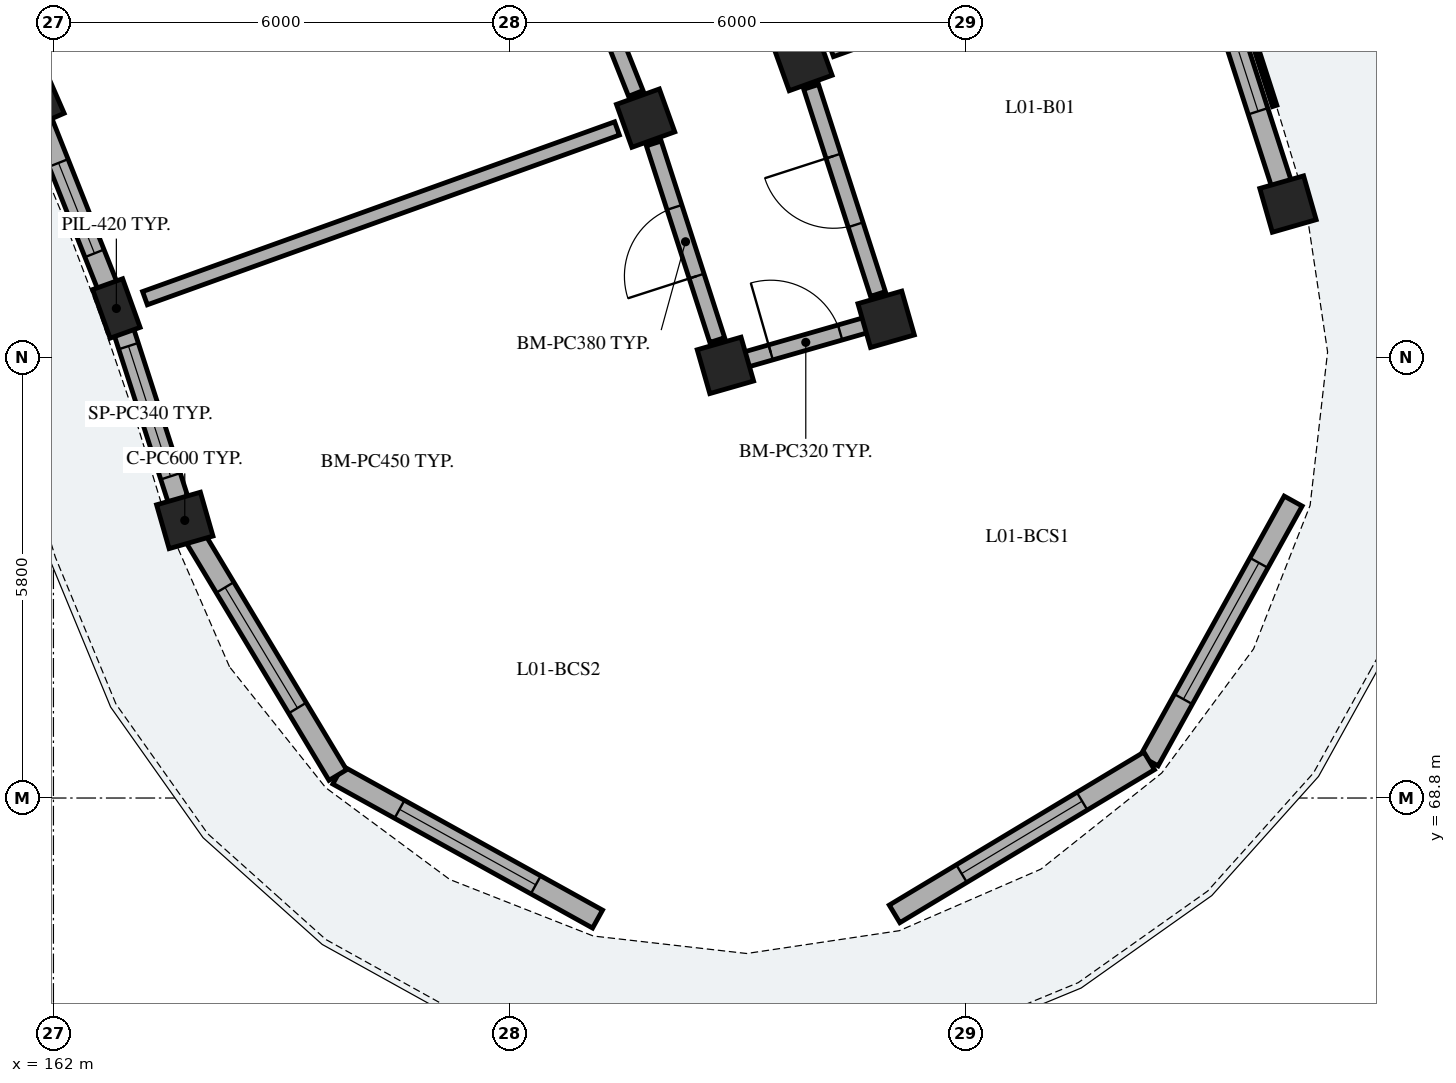
"""IFC4 building model, lengths in metres.
Left out: names, types, materials, properties, quantities, classifications, styles, units other than length and angle.
Written with IfcOpenShell. Run it as: python <this file> out.ifc"""

import sys

from ifc_helpers import new_model, si_unit, direction, frame, frame_2d, origin, origin_2d, place, context, subcontext, project, spatial, rectangle, extrude, element, fill, save


model = new_model("IFC4")
c1 = context("Model", 3, precision=1e-05, world=origin(), true_north=direction((0.0, 1.0)))
c2 = subcontext(c1, "Body", "Model", "MODEL_VIEW")
j1 = project(units=[si_unit("LENGTHUNIT", "METRE"), si_unit("PLANEANGLEUNIT", "RADIAN")], contexts=[c1])
p1 = place(None, origin())
s1 = spatial("IfcSite", under=j1, at=p1, CompositionType="ELEMENT")
p2 = place(p1, origin())
s2 = spatial("IfcBuilding", under=s1, at=p2, CompositionType="ELEMENT")
p3 = place(p2, frame((0.0, 0.0, 4.76)))
s3 = spatial("IfcBuildingStorey", under=s2, at=p3, CompositionType="ELEMENT", Elevation=4.76)
for number, where, z_axis, x_axis in (
    (1, (163.728, 72.452, 0.0), (0.0, 0.0, 1.0), (0.961, 0.276, 0.0)),
    (2, (170.841, 74.492, 0.0), (0.0, 0.0, 1.0), (0.961, 0.276, 0.0)),
    (3, (172.956, 75.098, 0.0), (0.0, 0.0, 1.0), (0.961, 0.276, 0.0)),
    (4, (178.243, 76.614, 0.0), (0.0, 0.0, 1.0), (0.961, 0.276, 0.0)),
):
    element("IfcColumn", number, at=place(p3, frame(where, z_axis=z_axis, x_axis=x_axis)), inside=s3, PredefinedType="COLUMN", context=c2, shape_type="SweptSolid", body=[
        extrude(rectangle(XDim=0.6, YDim=0.6, at=origin_2d()), origin(), (0.0, 0.0, 1.0), 3.825),
    ])
p4 = place(p3, frame((162.828, 75.241, 0.0), z_axis=(0.0, 0.0, 1.0), x_axis=(0.941012076693, 0.338372976931, 0.0)))
e5 = element("IfcColumn", 5, at=p4, inside=s3, PredefinedType="PILASTER", context=c2, shape_type="SweptSolid", body=[
    extrude(rectangle(XDim=0.42, YDim=0.68, at=origin_2d()), origin(), (0.0, 0.0, 1.0), 3.825),
])
for number, where, z_axis, x_axis in (
    (6, (169.792, 77.745, 0.0), (0.0, 0.0, 1.0), (0.941, 0.338, 0.0)),
    (7, (171.862, 78.489, 0.0), (0.0, 0.0, 1.0), (0.941, 0.338, 0.0)),
    (8, (161.746, 77.964, 0.0), (0.0, 0.0, 1.0), (0.917, 0.4, 0.0)),
):
    element("IfcColumn", number, at=place(p3, frame(where, z_axis=z_axis, x_axis=x_axis)), inside=s3, PredefinedType="COLUMN", context=c2, shape_type="SweptSolid", body=[
        extrude(rectangle(XDim=0.6, YDim=0.6, at=origin_2d()), origin(), (0.0, 0.0, 1.0), 3.825),
    ])
p5 = place(p3, frame((178.16, 76.871, 0.0), z_axis=(0.0, 0.0, 1.0), x_axis=(-0.307173119512, 0.951653652675, 0.0)))
e9 = element("IfcWall", 9, at=p5, inside=s3, PredefinedType="SOLIDWALL", context=c2, shape_type="SweptSolid", body=[
    extrude(rectangle(XDim=3.476, YDim=0.27, at=frame_2d((1.738, 0.0))), origin(), (0.0, 0.0, 1.0), 3.075),
])
p6 = place(p5, frame((1.013, 0.0, 0.55)))
e10 = element("IfcOpeningElement", 10, at=p6, cuts=e9, PredefinedType="OPENING", context=c2, shape_type="SweptSolid", body=[
    extrude(rectangle(XDim=1.45, YDim=1.7, at=frame_2d((0.725, 0.85))), frame((0.0, 0.145, 0.0), z_axis=(0.0, -1.0, 0.0), x_axis=(1.0, 0.0, 0.0)), (0.0, 0.0, 1.0), 0.29),
])
p7 = place(p3, frame((163.645, 72.709, 0.0), z_axis=(0.0, 0.0, 1.0), x_axis=(-0.307206966374, 0.951642726979, 0.0)))
e11 = element("IfcWall", 11, at=p7, inside=s3, PredefinedType="SOLIDWALL", context=c2, shape_type="SweptSolid", body=[
    extrude(rectangle(XDim=2.48, YDim=0.27, at=frame_2d((1.24, 0.0))), origin(), (0.0, 0.0, 1.0), 3.075),
])
p8 = place(p7, frame((0.34, 0.0, 0.55)))
e12 = element("IfcOpeningElement", 12, at=p8, cuts=e11, PredefinedType="OPENING", context=c2, shape_type="SweptSolid", body=[
    extrude(rectangle(XDim=1.8, YDim=1.85, at=frame_2d((0.9, 0.925))), frame((0.0, 0.145, 0.0), z_axis=(0.0, -1.0, 0.0), x_axis=(1.0, 0.0, 0.0)), (0.0, 0.0, 1.0), 0.29),
])
p9 = place(p3, frame((162.761, 75.408, 0.0), z_axis=(0.0, 0.0, 1.0), x_axis=(-0.369234261829, 0.929336354552, 0.0)))
e13 = element("IfcWall", 13, at=p9, inside=s3, PredefinedType="SOLIDWALL", context=c2, shape_type="SweptSolid", body=[
    extrude(rectangle(XDim=2.48, YDim=0.27, at=frame_2d((1.24, 0.0))), origin(), (0.0, 0.0, 1.0), 3.075),
])
p10 = place(p9, frame((0.6, 0.0, 0.55)))
e14 = element("IfcOpeningElement", 14, at=p10, cuts=e13, PredefinedType="OPENING", context=c2, shape_type="SweptSolid", body=[
    extrude(rectangle(XDim=1.28, YDim=1.52, at=frame_2d((0.64, 0.76))), frame((0.0, 0.145, 0.0), z_axis=(0.0, -1.0, 0.0), x_axis=(1.0, 0.0, 0.0)), (0.0, 0.0, 1.0), 0.29),
])
p11 = place(p3, frame((178.311, 72.707, 0.0), z_axis=(0.0, 0.0, 1.0), x_axis=(-0.484841794757, -0.874601871743, 0.0)))
e15 = element("IfcWall", 15, at=p11, inside=s3, PredefinedType="SOLIDWALL", context=c2, shape_type="SweptSolid", body=[
    extrude(rectangle(XDim=3.908, YDim=0.27, at=frame_2d((1.954, 0.0))), origin(), (0.0, 0.0, 1.0), 3.075),
])
p12 = place(p11, frame((0.929, 0.0, 0.4)))
e16 = element("IfcOpeningElement", 16, at=p12, cuts=e15, PredefinedType="OPENING", context=c2, shape_type="SweptSolid", body=[
    extrude(rectangle(XDim=2.05, YDim=1.82, at=frame_2d((1.025, 0.91))), frame((0.0, 0.145, 0.0), z_axis=(0.0, -1.0, 0.0), x_axis=(1.0, 0.0, 0.0)), (0.0, 0.0, 1.0), 0.29),
])
p13 = place(p3, frame((176.417, 69.289, 0.0), z_axis=(0.0, 0.0, 1.0), x_axis=(-0.85715098885, -0.515065221417, 0.0)))
e17 = element("IfcWall", 17, at=p13, inside=s3, PredefinedType="SOLIDWALL", context=c2, shape_type="SweptSolid", body=[
    extrude(rectangle(XDim=3.908, YDim=0.27, at=frame_2d((1.954, 0.0))), origin(), (0.0, 0.0, 1.0), 3.075),
])
p14 = place(p13, frame((1.029, 0.0, 0.4)))
e18 = element("IfcOpeningElement", 18, at=p14, cuts=e17, PredefinedType="OPENING", context=c2, shape_type="SweptSolid", body=[
    extrude(rectangle(XDim=1.85, YDim=1.72, at=frame_2d((0.925, 0.86))), frame((0.0, 0.145, 0.0), z_axis=(0.0, -1.0, 0.0), x_axis=(1.0, 0.0, 0.0)), (0.0, 0.0, 1.0), 0.29),
])
p15 = place(p3, frame((169.159, 67.208, 0.0), z_axis=(0.0, 0.0, 1.0), x_axis=(-0.874643043537, 0.484767517881, 0.0)))
e19 = element("IfcWall", 19, at=p15, inside=s3, PredefinedType="SOLIDWALL", context=c2, shape_type="SweptSolid", body=[
    extrude(rectangle(XDim=3.908, YDim=0.27, at=frame_2d((1.954, 0.0))), origin(), (0.0, 0.0, 1.0), 3.075),
])
p16 = place(p15, frame((0.929, 0.0, 0.4)))
e20 = element("IfcOpeningElement", 20, at=p16, cuts=e19, PredefinedType="OPENING", context=c2, shape_type="SweptSolid", body=[
    extrude(rectangle(XDim=2.05, YDim=1.82, at=frame_2d((1.025, 0.91))), frame((0.0, 0.145, 0.0), z_axis=(0.0, -1.0, 0.0), x_axis=(1.0, 0.0, 0.0)), (0.0, 0.0, 1.0), 0.29),
])
p17 = place(p3, frame((165.741, 69.102, 0.0), z_axis=(0.0, 0.0, 1.0), x_axis=(-0.515037642827, 0.857167560324, 0.0)))
e21 = element("IfcWall", 21, at=p17, inside=s3, PredefinedType="SOLIDWALL", context=c2, shape_type="SweptSolid", body=[
    extrude(rectangle(XDim=3.908, YDim=0.27, at=frame_2d((1.954, 0.0))), origin(), (0.0, 0.0, 1.0), 3.075),
])
p18 = place(p17, frame((1.029, 0.0, 0.4)))
e22 = element("IfcOpeningElement", 22, at=p18, cuts=e21, PredefinedType="OPENING", context=c2, shape_type="SweptSolid", body=[
    extrude(rectangle(XDim=1.85, YDim=1.72, at=frame_2d((0.925, 0.86))), frame((0.0, 0.145, 0.0), z_axis=(0.0, -1.0, 0.0), x_axis=(1.0, 0.0, 0.0)), (0.0, 0.0, 1.0), 0.29),
])
p19 = place(p3, frame((172.849, 75.431, 0.0), z_axis=(0.0, 0.0, 1.0), x_axis=(-0.307157249761, 0.951658774939, 0.0)))
e23 = element("IfcWall", 23, at=p19, inside=s3, PredefinedType="PARTITIONING", context=c2, shape_type="SweptSolid", body=[
    extrude(rectangle(XDim=2.863, YDim=0.205, at=frame_2d((1.432, 0.0))), origin(), (0.0, 0.0, 1.0), 3.09),
])
p20 = place(p19, frame((0.957, 0.0, 0.0)))
e24 = element("IfcOpeningElement", 24, at=p20, cuts=e23, PredefinedType="OPENING", context=c2, shape_type="SweptSolid", body=[
    extrude(rectangle(XDim=0.95, YDim=2.13, at=frame_2d((0.475, 1.065))), frame((0.0, 0.113, 0.0), z_axis=(0.0, -1.0, 0.0), x_axis=(1.0, 0.0, 0.0)), (0.0, 0.0, 1.0), 0.225),
])
p21 = place(p3, frame((170.734, 74.825, 0.0), z_axis=(0.0, 0.0, 1.0), x_axis=(-0.307186478934, 0.95164934044, 0.0)))
e25 = element("IfcWall", 25, at=p21, inside=s3, PredefinedType="PARTITIONING", context=c2, shape_type="SweptSolid", body=[
    extrude(rectangle(XDim=2.718, YDim=0.205, at=frame_2d((1.359, 0.0))), origin(), (0.0, 0.0, 1.0), 3.09),
])
p22 = place(p21, frame((0.884, 0.0, 0.0)))
e26 = element("IfcOpeningElement", 26, at=p22, cuts=e25, PredefinedType="OPENING", context=c2, shape_type="SweptSolid", body=[
    extrude(rectangle(XDim=0.95, YDim=2.13, at=frame_2d((0.475, 1.065))), frame((0.0, 0.113, 0.0), z_axis=(0.0, -1.0, 0.0), x_axis=(1.0, 0.0, 0.0)), (0.0, 0.0, 1.0), 0.225),
])
p23 = place(p3, frame((172.238, 78.625, 0.0), z_axis=(0.0, 0.0, 1.0), x_axis=(0.941015806044, 0.338362605463, 0.0)))
e27 = element("IfcWall", 27, at=p23, inside=s3, PredefinedType="PLUMBINGWALL", context=c2, shape_type="SweptSolid", body=[
    extrude(rectangle(XDim=4.7, YDim=0.15, at=frame_2d((2.35, 0.0))), origin(), (0.0, 0.0, 1.0), 3.09),
])
p24 = place(p23, frame((1.92, 0.0, 0.0)))
e28 = element("IfcOpeningElement", 28, at=p24, cuts=e27, PredefinedType="OPENING", context=c2, shape_type="SweptSolid", body=[
    extrude(rectangle(XDim=0.86, YDim=2.06, at=frame_2d((0.43, 1.03))), frame((0.0, 0.085, 0.0), z_axis=(0.0, -1.0, 0.0), x_axis=(1.0, 0.0, 0.0)), (0.0, 0.0, 1.0), 0.17),
])
p25 = place(p3, frame((163.204, 75.376, 0.0), z_axis=(0.0, 0.0, 1.0), x_axis=(0.941005714099, 0.338390670725, 0.0)))
e29 = element("IfcWall", 29, at=p25, inside=s3, PredefinedType="PARTITIONING", context=c2, shape_type="SweptSolid", body=[
    extrude(rectangle(XDim=6.6, YDim=0.185, at=frame_2d((3.3, 0.0))), origin(), (0.0, 0.0, 1.0), 3.09),
])
p26 = place(p3, frame((169.662, 78.07, 0.0), z_axis=(0.0, 0.0, 1.0), x_axis=(-0.369237170461, 0.929335198919, 0.0)))
e30 = element("IfcWall", 30, at=p26, inside=s3, PredefinedType="PARTITIONING", context=c2, shape_type="SweptSolid", body=[
    extrude(rectangle(XDim=2.718, YDim=0.205, at=frame_2d((1.359, 0.0))), origin(), (0.0, 0.0, 1.0), 3.09),
])
p27 = place(p26, frame((0.894, 0.0, 0.0)))
e31 = element("IfcOpeningElement", 31, at=p27, cuts=e30, PredefinedType="OPENING", context=c2, shape_type="SweptSolid", body=[
    extrude(rectangle(XDim=0.93, YDim=2.12, at=frame_2d((0.465, 1.06))), frame((0.0, 0.113, 0.0), z_axis=(0.0, -1.0, 0.0), x_axis=(1.0, 0.0, 0.0)), (0.0, 0.0, 1.0), 0.225),
])
p28 = place(p3, frame((170.889, 74.506, 0.0), z_axis=(0.0, 0.0, 1.0), x_axis=(0.961264701934, 0.275626872449, 0.0)))
e32 = element("IfcWall", 32, at=p28, inside=s3, PredefinedType="PARTITIONING", context=c2, shape_type="SweptSolid", body=[
    extrude(rectangle(XDim=2.1, YDim=0.205, at=frame_2d((1.05, 0.0))), origin(), (0.0, 0.0, 1.0), 3.09),
])
p29 = place(p28, frame((0.57, 0.0, 0.0)))
e33 = element("IfcOpeningElement", 33, at=p29, cuts=e32, PredefinedType="OPENING", context=c2, shape_type="SweptSolid", body=[
    extrude(rectangle(XDim=0.95, YDim=2.13, at=frame_2d((0.475, 1.065))), frame((0.0, 0.113, 0.0), z_axis=(0.0, -1.0, 0.0), x_axis=(1.0, 0.0, 0.0)), (0.0, 0.0, 1.0), 0.225),
])
p30 = place(p6, origin())
e34 = element("IfcWindow", 34, at=p30, inside=s3, PartitioningType="SINGLE_PANEL", PredefinedType="WINDOW", context=c2, shape_type="SweptSolid", body=[
    extrude(rectangle(XDim=1.45, YDim=1.7, at=frame_2d((0.725, 0.85))), frame((0.0, 0.03, 0.0), z_axis=(0.0, -1.0, 0.0), x_axis=(1.0, 0.0, 0.0)), (0.0, 0.0, 1.0), 0.06),
])
fill(e10, e34)
p31 = place(p8, origin())
e35 = element("IfcWindow", 35, at=p31, inside=s3, PartitioningType="SINGLE_PANEL", PredefinedType="WINDOW", context=c2, shape_type="SweptSolid", body=[
    extrude(rectangle(XDim=1.8, YDim=1.85, at=frame_2d((0.9, 0.925))), frame((0.0, 0.03, 0.0), z_axis=(0.0, -1.0, 0.0), x_axis=(1.0, 0.0, 0.0)), (0.0, 0.0, 1.0), 0.06),
])
fill(e12, e35)
p32 = place(p10, origin())
e36 = element("IfcWindow", 36, at=p32, inside=s3, PartitioningType="SINGLE_PANEL", PredefinedType="WINDOW", context=c2, shape_type="SweptSolid", body=[
    extrude(rectangle(XDim=1.28, YDim=1.52, at=frame_2d((0.64, 0.76))), frame((0.0, 0.03, 0.0), z_axis=(0.0, -1.0, 0.0), x_axis=(1.0, 0.0, 0.0)), (0.0, 0.0, 1.0), 0.06),
])
fill(e14, e36)
p33 = place(p12, origin())
e37 = element("IfcWindow", 37, at=p33, inside=s3, PartitioningType="SINGLE_PANEL", PredefinedType="WINDOW", context=c2, shape_type="SweptSolid", body=[
    extrude(rectangle(XDim=2.05, YDim=1.82, at=frame_2d((1.025, 0.91))), frame((0.0, 0.03, 0.0), z_axis=(0.0, -1.0, 0.0), x_axis=(1.0, 0.0, 0.0)), (0.0, 0.0, 1.0), 0.06),
])
fill(e16, e37)
p34 = place(p14, origin())
e38 = element("IfcWindow", 38, at=p34, inside=s3, PartitioningType="SINGLE_PANEL", PredefinedType="WINDOW", context=c2, shape_type="SweptSolid", body=[
    extrude(rectangle(XDim=1.85, YDim=1.72, at=frame_2d((0.925, 0.86))), frame((0.0, 0.03, 0.0), z_axis=(0.0, -1.0, 0.0), x_axis=(1.0, 0.0, 0.0)), (0.0, 0.0, 1.0), 0.06),
])
fill(e18, e38)
p35 = place(p16, origin())
e39 = element("IfcWindow", 39, at=p35, inside=s3, PartitioningType="SINGLE_PANEL", PredefinedType="WINDOW", context=c2, shape_type="SweptSolid", body=[
    extrude(rectangle(XDim=2.05, YDim=1.82, at=frame_2d((1.025, 0.91))), frame((0.0, 0.03, 0.0), z_axis=(0.0, -1.0, 0.0), x_axis=(1.0, 0.0, 0.0)), (0.0, 0.0, 1.0), 0.06),
])
fill(e20, e39)
p36 = place(p18, origin())
e40 = element("IfcWindow", 40, at=p36, inside=s3, PartitioningType="SINGLE_PANEL", PredefinedType="WINDOW", context=c2, shape_type="SweptSolid", body=[
    extrude(rectangle(XDim=1.85, YDim=1.72, at=frame_2d((0.925, 0.86))), frame((0.0, 0.03, 0.0), z_axis=(0.0, -1.0, 0.0), x_axis=(1.0, 0.0, 0.0)), (0.0, 0.0, 1.0), 0.06),
])
fill(e22, e40)
p37 = place(p20, origin())
e41 = element("IfcDoor", 41, at=p37, inside=s3, OperationType="SINGLE_SWING_RIGHT", PredefinedType="DOOR", context=c2, shape_type="SweptSolid", body=[
    extrude(rectangle(XDim=0.95, YDim=2.13, at=frame_2d((0.475, 1.065))), frame((0.0, 0.025, 0.0), z_axis=(0.0, -1.0, 0.0), x_axis=(1.0, 0.0, 0.0)), (0.0, 0.0, 1.0), 0.05),
])
fill(e24, e41)
p38 = place(p22, origin())
e42 = element("IfcDoor", 42, at=p38, inside=s3, OperationType="SINGLE_SWING_LEFT", PredefinedType="DOOR", context=c2, shape_type="SweptSolid", body=[
    extrude(rectangle(XDim=0.95, YDim=2.13, at=frame_2d((0.475, 1.065))), frame((0.0, 0.025, 0.0), z_axis=(0.0, -1.0, 0.0), x_axis=(1.0, 0.0, 0.0)), (0.0, 0.0, 1.0), 0.05),
])
fill(e26, e42)
p39 = place(p29, origin())
e43 = element("IfcDoor", 43, at=p39, inside=s3, OperationType="SINGLE_SWING_LEFT", PredefinedType="DOOR", context=c2, shape_type="SweptSolid", body=[
    extrude(rectangle(XDim=0.95, YDim=2.13, at=frame_2d((0.475, 1.065))), frame((0.0, 0.025, 0.0), z_axis=(0.0, -1.0, 0.0), x_axis=(1.0, 0.0, 0.0)), (0.0, 0.0, 1.0), 0.05),
])
fill(e33, e43)
save(model, sys.argv[1])
